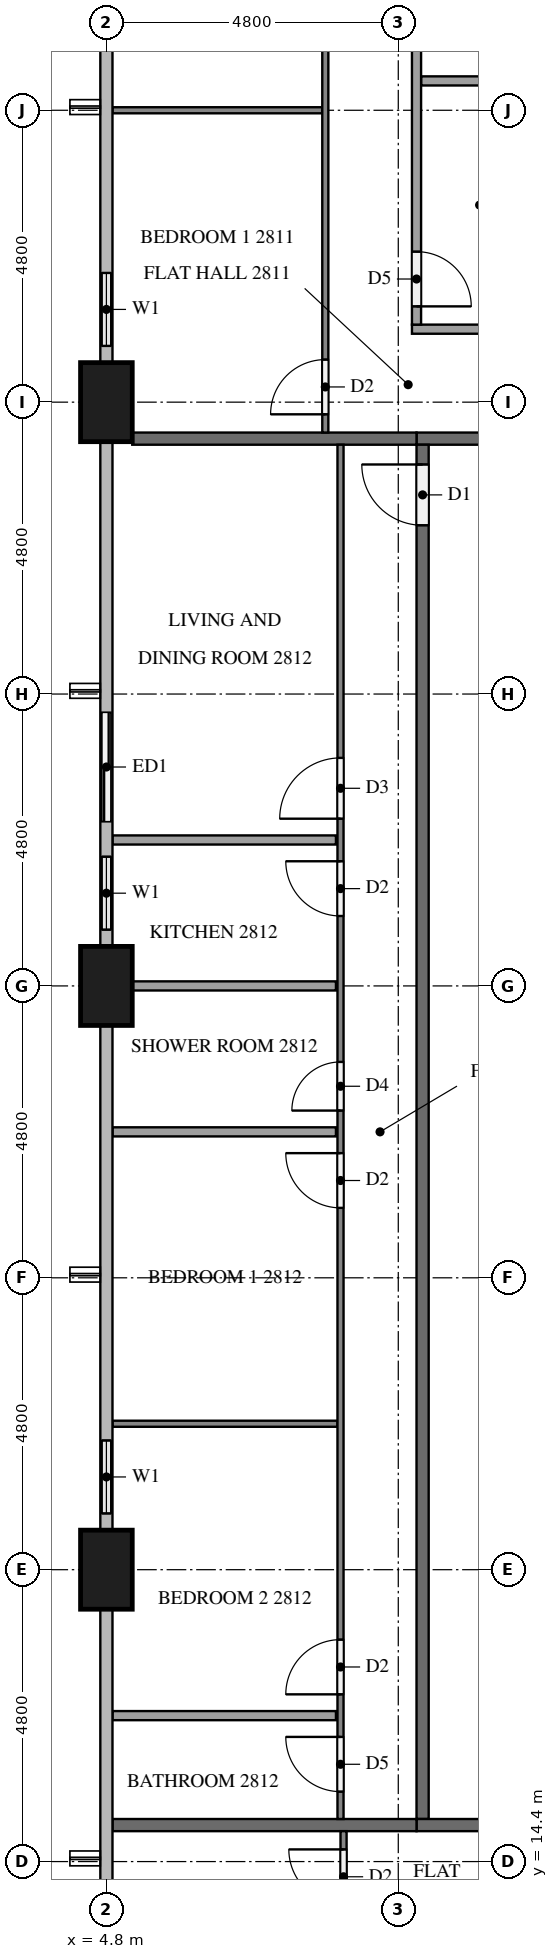
"""IFC4 building model, lengths in metres.
Left out: names, types, materials, properties, quantities, classifications, styles, units other than length and angle.
Written with IfcOpenShell. Run it as: python <this file> out.ifc"""

import sys

from ifc_helpers import new_model, si_unit, direction, frame, frame_2d, origin, origin_2d, place, context, subcontext, project, spatial, rectangle, extrude, element, fill, save


model = new_model("IFC4")
c1 = context("Model", 3, precision=1e-05, world=origin(), true_north=direction((0.0, 1.0)))
c2 = subcontext(c1, "Body", "Model", "MODEL_VIEW")
j1 = project(units=[si_unit("LENGTHUNIT", "METRE"), si_unit("PLANEANGLEUNIT", "RADIAN")], contexts=[c1])
p1 = place(None, origin())
s1 = spatial("IfcSite", under=j1, at=p1, CompositionType="ELEMENT")
p2 = place(p1, origin())
s2 = spatial("IfcBuilding", under=s1, at=p2, CompositionType="ELEMENT")
p3 = place(p2, frame((0.0, 0.0, 110.2)))
s3 = spatial("IfcBuildingStorey", under=s2, at=p3, CompositionType="ELEMENT", Elevation=110.2)
for number, where, z_axis, x_axis in (
    (1, (4.8, 38.4, 0.0), (0.0, 0.0, 1.0), (0.0, 1.0, 0.0)),
    (2, (4.8, 28.8, 0.0), (0.0, 0.0, 1.0), (0.0, 1.0, 0.0)),
    (3, (4.8, 19.2, 0.0), (0.0, 0.0, 1.0), (0.0, 1.0, 0.0)),
):
    element("IfcColumn", number, at=place(p3, frame(where, z_axis=z_axis, x_axis=x_axis)), inside=s3, PredefinedType="COLUMN", context=c2, shape_type="SweptSolid", body=[
        extrude(rectangle(XDim=1.3, YDim=0.85, at=origin_2d()), origin(), (0.0, 0.0, 1.0), 3.1),
    ])
p4 = place(p3, frame((4.8, 40.8, 0.0), z_axis=(0.0, 0.0, 1.0), x_axis=(0.0, -1.0, 0.0)))
e4 = element("IfcWall", 4, at=p4, inside=s3, PredefinedType="SOLIDWALL", context=c2, shape_type="SweptSolid", body=[
    extrude(rectangle(XDim=1.75, YDim=0.15, at=frame_2d((0.875, 0.0))), origin(), (0.0, 0.0, 1.0), 3.1),
])
p5 = place(p4, frame((0.275, 0.0, 0.9)))
e5 = element("IfcOpeningElement", 5, at=p5, cuts=e4, PredefinedType="OPENING", context=c2, shape_type="SweptSolid", body=[
    extrude(rectangle(XDim=1.2, YDim=1.4, at=frame_2d((0.6, 0.7))), frame((0.0, 0.085, 0.0), z_axis=(0.0, -1.0, 0.0), x_axis=(1.0, 0.0, 0.0)), (0.0, 0.0, 1.0), 0.17),
])
p6 = place(p3, frame((4.8, 33.6, 0.0), z_axis=(0.0, 0.0, 1.0), x_axis=(0.0, -1.0, 0.0)))
e6 = element("IfcWall", 6, at=p6, inside=s3, PredefinedType="SOLIDWALL", context=c2, shape_type="SweptSolid", body=[
    extrude(rectangle(XDim=4.15, YDim=0.15, at=frame_2d((2.075, 0.0))), origin(), (0.0, 0.0, 1.0), 3.1),
])
p7 = place(p6, frame((0.3, 0.0, 0.0)))
e7 = element("IfcOpeningElement", 7, at=p7, cuts=e6, PredefinedType="OPENING", context=c2, shape_type="SweptSolid", body=[
    extrude(rectangle(XDim=1.8, YDim=2.4, at=frame_2d((0.9, 1.2))), frame((0.0, 0.085, 0.0), z_axis=(0.0, -1.0, 0.0), x_axis=(1.0, 0.0, 0.0)), (0.0, 0.0, 1.0), 0.17),
])
p8 = place(p6, frame((2.675, 0.0, 0.9)))
e8 = element("IfcOpeningElement", 8, at=p8, cuts=e6, PredefinedType="OPENING", context=c2, shape_type="SweptSolid", body=[
    extrude(rectangle(XDim=1.2, YDim=1.4, at=frame_2d((0.6, 0.7))), frame((0.0, 0.085, 0.0), z_axis=(0.0, -1.0, 0.0), x_axis=(1.0, 0.0, 0.0)), (0.0, 0.0, 1.0), 0.17),
])
p9 = place(p3, frame((4.8, 21.6, 0.0), z_axis=(0.0, 0.0, 1.0), x_axis=(0.0, -1.0, 0.0)))
e9 = element("IfcWall", 9, at=p9, inside=s3, PredefinedType="SOLIDWALL", context=c2, shape_type="SweptSolid", body=[
    extrude(rectangle(XDim=1.75, YDim=0.15, at=frame_2d((0.875, 0.0))), origin(), (0.0, 0.0, 1.0), 3.1),
])
p10 = place(p9, frame((0.275, 0.0, 0.9)))
e10 = element("IfcOpeningElement", 10, at=p10, cuts=e9, PredefinedType="OPENING", context=c2, shape_type="SweptSolid", body=[
    extrude(rectangle(XDim=1.2, YDim=1.4, at=frame_2d((0.6, 0.7))), frame((0.0, 0.085, 0.0), z_axis=(0.0, -1.0, 0.0), x_axis=(1.0, 0.0, 0.0)), (0.0, 0.0, 1.0), 0.17),
])
p11 = place(p3, frame((12.1, 37.8, 0.0), z_axis=(0.0, 0.0, 1.0), x_axis=(-1.0, 0.0, 0.0)))
e11 = element("IfcWall", 11, at=p11, inside=s3, PredefinedType="PARTITIONING", context=c2, shape_type="SweptSolid", body=[
    extrude(rectangle(XDim=2.2, YDim=0.2, at=frame_2d((1.1, 0.0))), origin(), (0.0, 0.0, 1.0), 3.1),
])
p12 = place(p3, frame((10.0, 15.1, 0.0), z_axis=(0.0, 0.0, 1.0), x_axis=(0.0, 1.0, 0.0)))
e12 = element("IfcWall", 12, at=p12, inside=s3, PredefinedType="PARTITIONING", context=c2, shape_type="SweptSolid", body=[
    extrude(rectangle(XDim=22.6, YDim=0.2, at=frame_2d((11.3, 0.0))), origin(), (0.0, 0.0, 1.0), 3.1),
])
p13 = place(p12, frame((21.275, 0.0, 0.0)))
e13 = element("IfcOpeningElement", 13, at=p13, cuts=e12, PredefinedType="OPENING", context=c2, shape_type="SweptSolid", body=[
    extrude(rectangle(XDim=1.0, YDim=2.1, at=frame_2d((0.5, 1.05))), frame((0.0, 0.11, 0.0), z_axis=(0.0, -1.0, 0.0), x_axis=(1.0, 0.0, 0.0)), (0.0, 0.0, 1.0), 0.22),
])
p14 = place(p3, frame((9.9, 15.0, 0.0), z_axis=(0.0, 0.0, 1.0), x_axis=(1.0, 0.0, 0.0)))
e14 = element("IfcWall", 14, at=p14, inside=s3, PredefinedType="PARTITIONING", context=c2, shape_type="SweptSolid", body=[
    extrude(rectangle(XDim=2.2, YDim=0.2, at=frame_2d((1.1, 0.0))), origin(), (0.0, 0.0, 1.0), 3.1),
])
p15 = place(p3, frame((5.225, 37.8, 0.0), z_axis=(0.0, 0.0, 1.0), x_axis=(1.0, 0.0, 0.0)))
e15 = element("IfcWall", 15, at=p15, inside=s3, PredefinedType="PARTITIONING", context=c2, shape_type="SweptSolid", body=[
    extrude(rectangle(XDim=4.675, YDim=0.2, at=frame_2d((2.337, 0.0))), origin(), (0.0, 0.0, 1.0), 3.1),
])
p16 = place(p3, frame((4.9, 15.0, 0.0), z_axis=(0.0, 0.0, 1.0), x_axis=(1.0, 0.0, 0.0)))
e16 = element("IfcWall", 16, at=p16, inside=s3, PredefinedType="PARTITIONING", context=c2, shape_type="SweptSolid", body=[
    extrude(rectangle(XDim=5.0, YDim=0.2, at=frame_2d((2.5, 0.0))), origin(), (0.0, 0.0, 1.0), 3.1),
])
p17 = place(p3, frame((8.35, 43.2, 0.0), z_axis=(0.0, 0.0, 1.0), x_axis=(-1.0, 0.0, 0.0)))
e17 = element("IfcWall", 17, at=p17, inside=s3, PredefinedType="PARTITIONING", context=c2, shape_type="SweptSolid", body=[
    extrude(rectangle(XDim=3.45, YDim=0.1, at=frame_2d((1.725, 0.0))), origin(), (0.0, 0.0, 1.0), 3.1),
])
p18 = place(p3, frame((8.4, 37.9, 0.0), z_axis=(0.0, 0.0, 1.0), x_axis=(0.0, 1.0, 0.0)))
e18 = element("IfcWall", 18, at=p18, inside=s3, PredefinedType="PARTITIONING", context=c2, shape_type="SweptSolid", body=[
    extrude(rectangle(XDim=14.479, YDim=0.1, at=frame_2d((7.239, 0.0))), origin(), (0.0, 0.0, 1.0), 3.1),
])
p19 = place(p18, frame((0.3, 0.0, 0.0)))
e19 = element("IfcOpeningElement", 19, at=p19, cuts=e18, PredefinedType="OPENING", context=c2, shape_type="SweptSolid", body=[
    extrude(rectangle(XDim=0.9, YDim=2.1, at=frame_2d((0.45, 1.05))), frame((0.0, 0.06, 0.0), z_axis=(0.0, -1.0, 0.0), x_axis=(1.0, 0.0, 0.0)), (0.0, 0.0, 1.0), 0.12),
])
p20 = place(p18, frame((8.85, 0.0, 0.0)))
e20 = element("IfcOpeningElement", 20, at=p20, cuts=e18, PredefinedType="OPENING", context=c2, shape_type="SweptSolid", body=[
    extrude(rectangle(XDim=0.9, YDim=2.1, at=frame_2d((0.45, 1.05))), frame((0.0, 0.06, 0.0), z_axis=(0.0, -1.0, 0.0), x_axis=(1.0, 0.0, 0.0)), (0.0, 0.0, 1.0), 0.12),
])
p21 = place(p18, frame((10.45, 0.0, 0.0)))
e21 = element("IfcOpeningElement", 21, at=p21, cuts=e18, PredefinedType="OPENING", context=c2, shape_type="SweptSolid", body=[
    extrude(rectangle(XDim=1.0, YDim=2.1, at=frame_2d((0.5, 1.05))), frame((0.0, 0.06, 0.0), z_axis=(0.0, -1.0, 0.0), x_axis=(1.0, 0.0, 0.0)), (0.0, 0.0, 1.0), 0.12),
])
p22 = place(p3, frame((11.9, 43.683, 0.0), z_axis=(0.0, 0.0, 1.0), x_axis=(-1.0, 0.0, 0.0)))
e22 = element("IfcWall", 22, at=p22, inside=s3, PredefinedType="PARTITIONING", context=c2, shape_type="SweptSolid", body=[
    extrude(rectangle(XDim=1.925, YDim=0.15, at=frame_2d((0.962, 0.0))), origin(), (0.0, 0.0, 1.0), 3.1),
])
p23 = place(p3, frame((11.9, 39.6, 0.0), z_axis=(0.0, 0.0, 1.0), x_axis=(-1.0, 0.0, 0.0)))
e23 = element("IfcWall", 23, at=p23, inside=s3, PredefinedType="PARTITIONING", context=c2, shape_type="SweptSolid", body=[
    extrude(rectangle(XDim=2.075, YDim=0.15, at=frame_2d((1.038, 0.0))), origin(), (0.0, 0.0, 1.0), 3.1),
])
p24 = place(p3, frame((9.9, 52.225, 0.0), z_axis=(0.0, 0.0, 1.0), x_axis=(0.0, -1.0, 0.0)))
e24 = element("IfcWall", 24, at=p24, inside=s3, PredefinedType="PARTITIONING", context=c2, shape_type="SweptSolid", body=[
    extrude(rectangle(XDim=12.55, YDim=0.15, at=frame_2d((6.275, 0.0))), origin(), (0.0, 0.0, 1.0), 3.1),
])
p25 = place(p24, frame((11.35, 0.0, 0.0)))
e25 = element("IfcOpeningElement", 25, at=p25, cuts=e24, PredefinedType="OPENING", context=c2, shape_type="SweptSolid", body=[
    extrude(rectangle(XDim=0.9, YDim=2.1, at=frame_2d((0.45, 1.05))), frame((0.0, 0.085, 0.0), z_axis=(0.0, -1.0, 0.0), x_axis=(1.0, 0.0, 0.0)), (0.0, 0.0, 1.0), 0.17),
])
p26 = place(p24, frame((2.856, 0.0, 0.0)))
e26 = element("IfcOpeningElement", 26, at=p26, cuts=e24, PredefinedType="OPENING", context=c2, shape_type="SweptSolid", body=[
    extrude(rectangle(XDim=0.9, YDim=2.1, at=frame_2d((0.45, 1.05))), frame((0.0, 0.085, 0.0), z_axis=(0.0, -1.0, 0.0), x_axis=(1.0, 0.0, 0.0)), (0.0, 0.0, 1.0), 0.17),
])
p27 = place(p24, frame((1.406, 0.0, 0.0)))
e27 = element("IfcOpeningElement", 27, at=p27, cuts=e24, PredefinedType="OPENING", context=c2, shape_type="SweptSolid", body=[
    extrude(rectangle(XDim=0.8, YDim=2.1, at=frame_2d((0.4, 1.05))), frame((0.0, 0.085, 0.0), z_axis=(0.0, -1.0, 0.0), x_axis=(1.0, 0.0, 0.0)), (0.0, 0.0, 1.0), 0.17),
])
p28 = place(p3, frame((8.575, 31.2, 0.0), z_axis=(0.0, 0.0, 1.0), x_axis=(-1.0, 0.0, 0.0)))
e28 = element("IfcWall", 28, at=p28, inside=s3, PredefinedType="PARTITIONING", context=c2, shape_type="SweptSolid", body=[
    extrude(rectangle(XDim=3.675, YDim=0.15, at=frame_2d((1.837, 0.0))), origin(), (0.0, 0.0, 1.0), 3.1),
])
p29 = place(p3, frame((8.575, 28.8, 0.0), z_axis=(0.0, 0.0, 1.0), x_axis=(-1.0, 0.0, 0.0)))
e29 = element("IfcWall", 29, at=p29, inside=s3, PredefinedType="PARTITIONING", context=c2, shape_type="SweptSolid", body=[
    extrude(rectangle(XDim=3.35, YDim=0.15, at=frame_2d((1.675, 0.0))), origin(), (0.0, 0.0, 1.0), 3.1),
])
p30 = place(p3, frame((8.575, 26.4, 0.0), z_axis=(0.0, 0.0, 1.0), x_axis=(-1.0, 0.0, 0.0)))
e30 = element("IfcWall", 30, at=p30, inside=s3, PredefinedType="PARTITIONING", context=c2, shape_type="SweptSolid", body=[
    extrude(rectangle(XDim=3.675, YDim=0.15, at=frame_2d((1.837, 0.0))), origin(), (0.0, 0.0, 1.0), 3.1),
])
p31 = place(p3, frame((8.6, 21.6, 0.0), z_axis=(0.0, 0.0, 1.0), x_axis=(-1.0, 0.0, 0.0)))
e31 = element("IfcWall", 31, at=p31, inside=s3, PredefinedType="PARTITIONING", context=c2, shape_type="SweptSolid", body=[
    extrude(rectangle(XDim=3.7, YDim=0.1, at=frame_2d((1.85, 0.0))), origin(), (0.0, 0.0, 1.0), 3.1),
])
p32 = place(p3, frame((8.575, 16.8, 0.0), z_axis=(0.0, 0.0, 1.0), x_axis=(-1.0, 0.0, 0.0)))
e32 = element("IfcWall", 32, at=p32, inside=s3, PredefinedType="PARTITIONING", context=c2, shape_type="SweptSolid", body=[
    extrude(rectangle(XDim=3.675, YDim=0.15, at=frame_2d((1.837, 0.0))), origin(), (0.0, 0.0, 1.0), 3.1),
])
p33 = place(p3, frame((8.65, 15.1, 0.0), z_axis=(0.0, 0.0, 1.0), x_axis=(0.0, 1.0, 0.0)))
e33 = element("IfcWall", 33, at=p33, inside=s3, PredefinedType="PARTITIONING", context=c2, shape_type="SweptSolid", body=[
    extrude(rectangle(XDim=22.6, YDim=0.1, at=frame_2d((11.3, 0.0))), origin(), (0.0, 0.0, 1.0), 3.1),
])
p34 = place(p33, frame((16.45, 0.0, 0.0)))
e34 = element("IfcOpeningElement", 34, at=p34, cuts=e33, PredefinedType="OPENING", context=c2, shape_type="SweptSolid", body=[
    extrude(rectangle(XDim=1.0, YDim=2.1, at=frame_2d((0.5, 1.05))), frame((0.0, 0.06, 0.0), z_axis=(0.0, -1.0, 0.0), x_axis=(1.0, 0.0, 0.0)), (0.0, 0.0, 1.0), 0.12),
])
p35 = place(p33, frame((14.85, 0.0, 0.0)))
e35 = element("IfcOpeningElement", 35, at=p35, cuts=e33, PredefinedType="OPENING", context=c2, shape_type="SweptSolid", body=[
    extrude(rectangle(XDim=0.9, YDim=2.1, at=frame_2d((0.45, 1.05))), frame((0.0, 0.06, 0.0), z_axis=(0.0, -1.0, 0.0), x_axis=(1.0, 0.0, 0.0)), (0.0, 0.0, 1.0), 0.12),
])
p36 = place(p33, frame((11.65, 0.0, 0.0)))
e36 = element("IfcOpeningElement", 36, at=p36, cuts=e33, PredefinedType="OPENING", context=c2, shape_type="SweptSolid", body=[
    extrude(rectangle(XDim=0.8, YDim=2.1, at=frame_2d((0.4, 1.05))), frame((0.0, 0.06, 0.0), z_axis=(0.0, -1.0, 0.0), x_axis=(1.0, 0.0, 0.0)), (0.0, 0.0, 1.0), 0.12),
])
p37 = place(p33, frame((10.05, 0.0, 0.0)))
e37 = element("IfcOpeningElement", 37, at=p37, cuts=e33, PredefinedType="OPENING", context=c2, shape_type="SweptSolid", body=[
    extrude(rectangle(XDim=0.9, YDim=2.1, at=frame_2d((0.45, 1.05))), frame((0.0, 0.06, 0.0), z_axis=(0.0, -1.0, 0.0), x_axis=(1.0, 0.0, 0.0)), (0.0, 0.0, 1.0), 0.12),
])
p38 = place(p33, frame((2.05, 0.0, 0.0)))
e38 = element("IfcOpeningElement", 38, at=p38, cuts=e33, PredefinedType="OPENING", context=c2, shape_type="SweptSolid", body=[
    extrude(rectangle(XDim=0.9, YDim=2.1, at=frame_2d((0.45, 1.05))), frame((0.0, 0.06, 0.0), z_axis=(0.0, -1.0, 0.0), x_axis=(1.0, 0.0, 0.0)), (0.0, 0.0, 1.0), 0.12),
])
p39 = place(p33, frame((0.45, 0.0, 0.0)))
e39 = element("IfcOpeningElement", 39, at=p39, cuts=e33, PredefinedType="OPENING", context=c2, shape_type="SweptSolid", body=[
    extrude(rectangle(XDim=0.9, YDim=2.1, at=frame_2d((0.45, 1.05))), frame((0.0, 0.06, 0.0), z_axis=(0.0, -1.0, 0.0), x_axis=(1.0, 0.0, 0.0)), (0.0, 0.0, 1.0), 0.12),
])
p40 = place(p3, frame((8.7, 5.141, 0.0), z_axis=(0.0, 0.0, 1.0), x_axis=(0.0, 1.0, 0.0)))
e40 = element("IfcWall", 40, at=p40, inside=s3, PredefinedType="PARTITIONING", context=c2, shape_type="SweptSolid", body=[
    extrude(rectangle(XDim=9.759, YDim=0.1, at=frame_2d((4.879, 0.0))), origin(), (0.0, 0.0, 1.0), 3.1),
])
p41 = place(p40, frame((8.559, 0.0, 0.0)))
e41 = element("IfcOpeningElement", 41, at=p41, cuts=e40, PredefinedType="OPENING", context=c2, shape_type="SweptSolid", body=[
    extrude(rectangle(XDim=0.9, YDim=2.1, at=frame_2d((0.45, 1.05))), frame((0.0, 0.06, 0.0), z_axis=(0.0, -1.0, 0.0), x_axis=(1.0, 0.0, 0.0)), (0.0, 0.0, 1.0), 0.12),
])
p42 = place(p40, frame((0.3, 0.0, 0.0)))
e42 = element("IfcOpeningElement", 42, at=p42, cuts=e40, PredefinedType="OPENING", context=c2, shape_type="SweptSolid", body=[
    extrude(rectangle(XDim=1.0, YDim=2.1, at=frame_2d((0.5, 1.05))), frame((0.0, 0.06, 0.0), z_axis=(0.0, -1.0, 0.0), x_axis=(1.0, 0.0, 0.0)), (0.0, 0.0, 1.0), 0.12),
])
p43 = place(p5, origin())
e43 = element("IfcWindow", 43, at=p43, inside=s3, PartitioningType="SINGLE_PANEL", PredefinedType="WINDOW", context=c2, shape_type="SweptSolid", body=[
    extrude(rectangle(XDim=1.2, YDim=1.4, at=frame_2d((0.6, 0.7))), frame((0.0, 0.03, 0.0), z_axis=(0.0, -1.0, 0.0), x_axis=(1.0, 0.0, 0.0)), (0.0, 0.0, 1.0), 0.06),
])
fill(e5, e43)
p44 = place(p7, origin())
e44 = element("IfcDoor", 44, at=p44, inside=s3, OperationType="SLIDING_TO_RIGHT", PredefinedType="DOOR", context=c2, shape_type="SweptSolid", body=[
    extrude(rectangle(XDim=1.8, YDim=2.4, at=frame_2d((0.9, 1.2))), frame((0.0, 0.025, 0.0), z_axis=(0.0, -1.0, 0.0), x_axis=(1.0, 0.0, 0.0)), (0.0, 0.0, 1.0), 0.05),
])
fill(e7, e44)
p45 = place(p8, origin())
e45 = element("IfcWindow", 45, at=p45, inside=s3, PartitioningType="SINGLE_PANEL", PredefinedType="WINDOW", context=c2, shape_type="SweptSolid", body=[
    extrude(rectangle(XDim=1.2, YDim=1.4, at=frame_2d((0.6, 0.7))), frame((0.0, 0.03, 0.0), z_axis=(0.0, -1.0, 0.0), x_axis=(1.0, 0.0, 0.0)), (0.0, 0.0, 1.0), 0.06),
])
fill(e8, e45)
p46 = place(p10, origin())
e46 = element("IfcWindow", 46, at=p46, inside=s3, PartitioningType="SINGLE_PANEL", PredefinedType="WINDOW", context=c2, shape_type="SweptSolid", body=[
    extrude(rectangle(XDim=1.2, YDim=1.4, at=frame_2d((0.6, 0.7))), frame((0.0, 0.03, 0.0), z_axis=(0.0, -1.0, 0.0), x_axis=(1.0, 0.0, 0.0)), (0.0, 0.0, 1.0), 0.06),
])
fill(e10, e46)
p47 = place(p13, origin())
e47 = element("IfcDoor", 47, at=p47, inside=s3, OperationType="SINGLE_SWING_RIGHT", PredefinedType="DOOR", context=c2, shape_type="SweptSolid", body=[
    extrude(rectangle(XDim=1.0, YDim=2.1, at=frame_2d((0.5, 1.05))), frame((0.0, 0.025, 0.0), z_axis=(0.0, -1.0, 0.0), x_axis=(1.0, 0.0, 0.0)), (0.0, 0.0, 1.0), 0.05),
])
fill(e13, e47)
p48 = place(p19, origin())
e48 = element("IfcDoor", 48, at=p48, inside=s3, OperationType="SINGLE_SWING_LEFT", PredefinedType="DOOR", context=c2, shape_type="SweptSolid", body=[
    extrude(rectangle(XDim=0.9, YDim=2.1, at=frame_2d((0.45, 1.05))), frame((0.0, 0.025, 0.0), z_axis=(0.0, -1.0, 0.0), x_axis=(1.0, 0.0, 0.0)), (0.0, 0.0, 1.0), 0.05),
])
fill(e19, e48)
p49 = place(p25, origin())
e49 = element("IfcDoor", 49, at=p49, inside=s3, OperationType="SINGLE_SWING_RIGHT", PredefinedType="DOOR", context=c2, shape_type="SweptSolid", body=[
    extrude(rectangle(XDim=0.9, YDim=2.1, at=frame_2d((0.45, 1.05))), frame((0.0, 0.025, 0.0), z_axis=(0.0, -1.0, 0.0), x_axis=(1.0, 0.0, 0.0)), (0.0, 0.0, 1.0), 0.05),
])
fill(e25, e49)
p50 = place(p34, origin())
e50 = element("IfcDoor", 50, at=p50, inside=s3, OperationType="SINGLE_SWING_LEFT", PredefinedType="DOOR", context=c2, shape_type="SweptSolid", body=[
    extrude(rectangle(XDim=1.0, YDim=2.1, at=frame_2d((0.5, 1.05))), frame((0.0, 0.025, 0.0), z_axis=(0.0, -1.0, 0.0), x_axis=(1.0, 0.0, 0.0)), (0.0, 0.0, 1.0), 0.05),
])
fill(e34, e50)
p51 = place(p35, origin())
e51 = element("IfcDoor", 51, at=p51, inside=s3, OperationType="SINGLE_SWING_RIGHT", PredefinedType="DOOR", context=c2, shape_type="SweptSolid", body=[
    extrude(rectangle(XDim=0.9, YDim=2.1, at=frame_2d((0.45, 1.05))), frame((0.0, 0.025, 0.0), z_axis=(0.0, -1.0, 0.0), x_axis=(1.0, 0.0, 0.0)), (0.0, 0.0, 1.0), 0.05),
])
fill(e35, e51)
p52 = place(p36, origin())
e52 = element("IfcDoor", 52, at=p52, inside=s3, OperationType="SINGLE_SWING_LEFT", PredefinedType="DOOR", context=c2, shape_type="SweptSolid", body=[
    extrude(rectangle(XDim=0.8, YDim=2.1, at=frame_2d((0.4, 1.05))), frame((0.0, 0.025, 0.0), z_axis=(0.0, -1.0, 0.0), x_axis=(1.0, 0.0, 0.0)), (0.0, 0.0, 1.0), 0.05),
])
fill(e36, e52)
p53 = place(p37, origin())
e53 = element("IfcDoor", 53, at=p53, inside=s3, OperationType="SINGLE_SWING_RIGHT", PredefinedType="DOOR", context=c2, shape_type="SweptSolid", body=[
    extrude(rectangle(XDim=0.9, YDim=2.1, at=frame_2d((0.45, 1.05))), frame((0.0, 0.025, 0.0), z_axis=(0.0, -1.0, 0.0), x_axis=(1.0, 0.0, 0.0)), (0.0, 0.0, 1.0), 0.05),
])
fill(e37, e53)
p54 = place(p38, origin())
e54 = element("IfcDoor", 54, at=p54, inside=s3, OperationType="SINGLE_SWING_LEFT", PredefinedType="DOOR", context=c2, shape_type="SweptSolid", body=[
    extrude(rectangle(XDim=0.9, YDim=2.1, at=frame_2d((0.45, 1.05))), frame((0.0, 0.025, 0.0), z_axis=(0.0, -1.0, 0.0), x_axis=(1.0, 0.0, 0.0)), (0.0, 0.0, 1.0), 0.05),
])
fill(e38, e54)
p55 = place(p39, origin())
e55 = element("IfcDoor", 55, at=p55, inside=s3, OperationType="SINGLE_SWING_RIGHT", PredefinedType="DOOR", context=c2, shape_type="SweptSolid", body=[
    extrude(rectangle(XDim=0.9, YDim=2.1, at=frame_2d((0.45, 1.05))), frame((0.0, 0.025, 0.0), z_axis=(0.0, -1.0, 0.0), x_axis=(1.0, 0.0, 0.0)), (0.0, 0.0, 1.0), 0.05),
])
fill(e39, e55)
p56 = place(p41, origin())
e56 = element("IfcDoor", 56, at=p56, inside=s3, OperationType="SINGLE_SWING_RIGHT", PredefinedType="DOOR", context=c2, shape_type="SweptSolid", body=[
    extrude(rectangle(XDim=0.9, YDim=2.1, at=frame_2d((0.45, 1.05))), frame((0.0, 0.025, 0.0), z_axis=(0.0, -1.0, 0.0), x_axis=(1.0, 0.0, 0.0)), (0.0, 0.0, 1.0), 0.05),
])
fill(e41, e56)
save(model, sys.argv[1])
